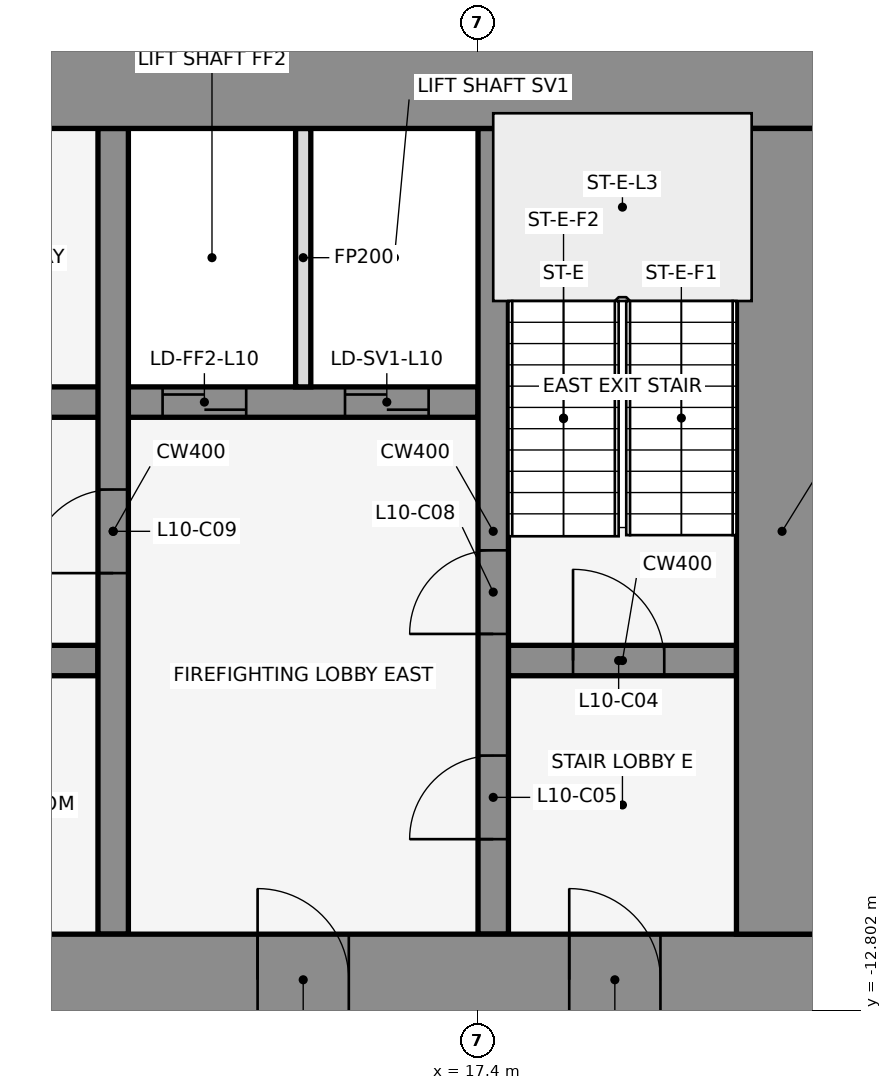
"""IFC4 building model, lengths in metres.
Left out: names, types, materials, properties, quantities, classifications, styles, units other than length and angle.
Written with IfcOpenShell. Run it as: python <this file> out.ifc"""

import sys

from ifc_helpers import new_model, si_unit, direction, frame, frame_2d, origin, place, context, subcontext, project, spatial, rectangle, extrude, element, fill, save


model = new_model("IFC4")
c1 = context("Model", 3, precision=1e-05, world=origin(), true_north=direction((0.0, 1.0)))
c2 = subcontext(c1, "Body", "Model", "MODEL_VIEW")
j1 = project(units=[si_unit("LENGTHUNIT", "METRE"), si_unit("PLANEANGLEUNIT", "RADIAN")], contexts=[c1])
p1 = place(None, origin())
s1 = spatial("IfcSite", under=j1, at=p1, CompositionType="ELEMENT")
p2 = place(p1, origin())
s2 = spatial("IfcBuilding", under=s1, at=p2, CompositionType="ELEMENT")
p3 = place(p2, frame((0.0, 0.0, 53.0)))
s3 = spatial("IfcBuildingStorey", under=s2, at=p3, CompositionType="ELEMENT", Elevation=53.0)
p4 = place(p3, frame((16.432, -0.105, 0.0), z_axis=(0.0, 0.0, 1.0), x_axis=(-0.83981312244, 0.542875602121, 0.0)))
e1 = element("IfcWall", 1, at=p4, inside=s3, PredefinedType="STANDARD", context=c2, shape_type="SweptSolid", body=[
    extrude(rectangle(XDim=2.183, YDim=0.25, at=frame_2d((1.091, 0.0))), origin(), (0.0, 0.0, 1.0), 4.35),
])
p5 = place(p3, frame((6.4, -8.2, 0.0), z_axis=(0.0, 0.0, 1.0), x_axis=(1.0, 0.0, 0.0)))
e2 = element("IfcWall", 2, at=p5, inside=s3, PredefinedType="SHEAR", context=c2, shape_type="SweptSolid", body=[
    extrude(rectangle(XDim=6.0, YDim=0.4, at=frame_2d((3.0, 0.0))), origin(), (0.0, 0.0, 1.0), 4.5),
])
p6 = place(p5, frame((4.15, 0.0, 0.0)))
e3 = element("IfcOpeningElement", 3, at=p6, cuts=e2, PredefinedType="OPENING", context=c2, shape_type="SweptSolid", body=[
    extrude(rectangle(XDim=0.9, YDim=2.1, at=frame_2d((0.45, 1.05))), frame((0.0, 0.212, 0.0), z_axis=(0.0, -1.0, 0.0), x_axis=(1.0, 0.0, 0.0)), (0.0, 0.0, 1.0), 0.424),
])
p7 = place(p3, frame((17.8, -8.2, 0.0), z_axis=(0.0, 0.0, 1.0), x_axis=(1.0, 0.0, 0.0)))
e4 = element("IfcWall", 4, at=p7, inside=s3, PredefinedType="SHEAR", context=c2, shape_type="SweptSolid", body=[
    extrude(rectangle(XDim=3.0, YDim=0.4, at=frame_2d((1.5, 0.0))), origin(), (0.0, 0.0, 1.0), 4.5),
])
p8 = place(p7, frame((0.85, 0.0, 0.0)))
e5 = element("IfcOpeningElement", 5, at=p8, cuts=e4, PredefinedType="OPENING", context=c2, shape_type="SweptSolid", body=[
    extrude(rectangle(XDim=1.2, YDim=2.1, at=frame_2d((0.6, 1.05))), frame((0.0, 0.212, 0.0), z_axis=(0.0, -1.0, 0.0), x_axis=(1.0, 0.0, 0.0)), (0.0, 0.0, 1.0), 0.424),
])
p9 = place(p3, frame((3.8, -4.8, 0.0), z_axis=(0.0, 0.0, 1.0), x_axis=(1.0, 0.0, 0.0)))
e6 = element("IfcWall", 6, at=p9, inside=s3, PredefinedType="SHEAR", context=c2, shape_type="SweptSolid", body=[
    extrude(rectangle(XDim=13.6, YDim=0.4, at=frame_2d((6.8, 0.0))), origin(), (0.0, 0.0, 1.0), 4.5),
])
p10 = place(p9, frame((9.45, 0.0, 0.0)))
e7 = element("IfcOpeningElement", 7, at=p10, cuts=e6, PredefinedType="OPENING", context=c2, shape_type="SweptSolid", body=[
    extrude(rectangle(XDim=1.1, YDim=2.1, at=frame_2d((0.55, 1.05))), frame((0.0, 0.212, 0.0), z_axis=(0.0, -1.0, 0.0), x_axis=(1.0, 0.0, 0.0)), (0.0, 0.0, 1.0), 0.424),
])
p11 = place(p9, frame((11.85, 0.0, 0.0)))
e8 = element("IfcOpeningElement", 8, at=p11, cuts=e6, PredefinedType="OPENING", context=c2, shape_type="SweptSolid", body=[
    extrude(rectangle(XDim=1.1, YDim=2.1, at=frame_2d((0.55, 1.05))), frame((0.0, 0.212, 0.0), z_axis=(0.0, -1.0, 0.0), x_axis=(1.0, 0.0, 0.0)), (0.0, 0.0, 1.0), 0.424),
])
p12 = place(p9, frame((2.45, 0.0, 0.0)))
e9 = element("IfcOpeningElement", 9, at=p12, cuts=e6, PredefinedType="OPENING", context=c2, shape_type="SweptSolid", body=[
    extrude(rectangle(XDim=0.9, YDim=2.1, at=frame_2d((0.45, 1.05))), frame((0.0, 0.212, 0.0), z_axis=(0.0, -1.0, 0.0), x_axis=(1.0, 0.0, 0.0)), (0.0, 0.0, 1.0), 0.424),
])
p13 = place(p9, frame((6.85, 0.0, 0.0)))
e10 = element("IfcOpeningElement", 10, at=p13, cuts=e6, PredefinedType="OPENING", context=c2, shape_type="SweptSolid", body=[
    extrude(rectangle(XDim=0.9, YDim=2.1, at=frame_2d((0.45, 1.05))), frame((0.0, 0.212, 0.0), z_axis=(0.0, -1.0, 0.0), x_axis=(1.0, 0.0, 0.0)), (0.0, 0.0, 1.0), 0.424),
])
p14 = place(p3, frame((12.6, -11.8, 0.0), z_axis=(0.0, 0.0, 1.0), x_axis=(0.0, 1.0, 0.0)))
e11 = element("IfcWall", 11, at=p14, inside=s3, PredefinedType="SHEAR", context=c2, shape_type="SweptSolid", body=[
    extrude(rectangle(XDim=10.6, YDim=0.4, at=frame_2d((5.3, 0.0))), origin(), (0.0, 0.0, 1.0), 4.5),
])
p15 = place(p14, frame((4.75, 0.0, 0.0)))
e12 = element("IfcOpeningElement", 12, at=p15, cuts=e11, PredefinedType="OPENING", context=c2, shape_type="SweptSolid", body=[
    extrude(rectangle(XDim=1.1, YDim=2.1, at=frame_2d((0.55, 1.05))), frame((0.0, 0.212, 0.0), z_axis=(0.0, -1.0, 0.0), x_axis=(1.0, 0.0, 0.0)), (0.0, 0.0, 1.0), 0.424),
])
p16 = place(p3, frame((15.1, -4.6, 0.0), z_axis=(0.0, 0.0, 1.0), x_axis=(0.0, 1.0, 0.0)))
e13 = element("IfcWall", 13, at=p16, inside=s3, PredefinedType="PARTITIONING", context=c2, shape_type="SweptSolid", body=[
    extrude(rectangle(XDim=3.4, YDim=0.2, at=frame_2d((1.7, 0.0))), origin(), (0.0, 0.0, 1.0), 3.418),
])
p17 = place(p3, frame((17.6, -11.8, 0.0), z_axis=(0.0, 0.0, 1.0), x_axis=(0.0, 1.0, 0.0)))
e14 = element("IfcWall", 14, at=p17, inside=s3, PredefinedType="SHEAR", context=c2, shape_type="SweptSolid", body=[
    extrude(rectangle(XDim=10.6, YDim=0.4, at=frame_2d((5.3, 0.0))), origin(), (0.0, 0.0, 1.0), 4.5),
])
p18 = place(p17, frame((1.25, 0.0, 0.0)))
e15 = element("IfcOpeningElement", 15, at=p18, cuts=e14, PredefinedType="OPENING", context=c2, shape_type="SweptSolid", body=[
    extrude(rectangle(XDim=1.1, YDim=2.1, at=frame_2d((0.55, 1.05))), frame((0.0, 0.212, 0.0), z_axis=(0.0, -1.0, 0.0), x_axis=(1.0, 0.0, 0.0)), (0.0, 0.0, 1.0), 0.424),
])
p19 = place(p17, frame((3.95, 0.0, 0.0)))
e16 = element("IfcOpeningElement", 16, at=p19, cuts=e14, PredefinedType="OPENING", context=c2, shape_type="SweptSolid", body=[
    extrude(rectangle(XDim=1.1, YDim=2.1, at=frame_2d((0.55, 1.05))), frame((0.0, 0.212, 0.0), z_axis=(0.0, -1.0, 0.0), x_axis=(1.0, 0.0, 0.0)), (0.0, 0.0, 1.0), 0.424),
])
p20 = place(p3, frame((-22.0, -0.6, 0.0), z_axis=(0.0, 0.0, 1.0), x_axis=(1.0, 0.0, 0.0)))
e17 = element("IfcWall", 17, at=p20, inside=s3, PredefinedType="SHEAR", context=c2, shape_type="SweptSolid", body=[
    extrude(rectangle(XDim=44.0, YDim=1.2, at=frame_2d((22.0, 0.0))), origin(), (0.0, 0.0, 1.0), 4.5),
])
p21 = place(p20, frame((18.55, 0.0, 0.0)))
e18 = element("IfcOpeningElement", 18, at=p21, cuts=e17, PredefinedType="OPENING", context=c2, shape_type="SweptSolid", body=[
    extrude(rectangle(XDim=0.9, YDim=2.1, at=frame_2d((0.45, 1.05))), frame((0.0, 0.612, 0.0), z_axis=(0.0, -1.0, 0.0), x_axis=(1.0, 0.0, 0.0)), (0.0, 0.0, 1.0), 1.224),
])
p22 = place(p20, frame((24.55, 0.0, 0.0)))
e19 = element("IfcOpeningElement", 19, at=p22, cuts=e17, PredefinedType="OPENING", context=c2, shape_type="SweptSolid", body=[
    extrude(rectangle(XDim=0.9, YDim=2.1, at=frame_2d((0.45, 1.05))), frame((0.0, 0.612, 0.0), z_axis=(0.0, -1.0, 0.0), x_axis=(1.0, 0.0, 0.0)), (0.0, 0.0, 1.0), 1.224),
])
p23 = place(p3, frame((-22.0, -12.4, 0.0), z_axis=(0.0, 0.0, 1.0), x_axis=(1.0, 0.0, 0.0)))
e20 = element("IfcWall", 20, at=p23, inside=s3, PredefinedType="SHEAR", context=c2, shape_type="SweptSolid", body=[
    extrude(rectangle(XDim=44.0, YDim=1.2, at=frame_2d((22.0, 0.0))), origin(), (0.0, 0.0, 1.0), 4.5),
])
p24 = place(p23, frame((2.2, 0.0, 0.0)))
e21 = element("IfcOpeningElement", 21, at=p24, cuts=e20, PredefinedType="OPENING", context=c2, shape_type="SweptSolid", body=[
    extrude(rectangle(XDim=1.2, YDim=2.1, at=frame_2d((0.6, 1.05))), frame((0.0, 0.612, 0.0), z_axis=(0.0, -1.0, 0.0), x_axis=(1.0, 0.0, 0.0)), (0.0, 0.0, 1.0), 1.224),
])
p25 = place(p23, frame((21.4, 0.0, 0.0)))
e22 = element("IfcOpeningElement", 22, at=p25, cuts=e20, PredefinedType="OPENING", context=c2, shape_type="SweptSolid", body=[
    extrude(rectangle(XDim=1.2, YDim=2.1, at=frame_2d((0.6, 1.05))), frame((0.0, 0.612, 0.0), z_axis=(0.0, -1.0, 0.0), x_axis=(1.0, 0.0, 0.0)), (0.0, 0.0, 1.0), 1.224),
])
p26 = place(p23, frame((40.6, 0.0, 0.0)))
e23 = element("IfcOpeningElement", 23, at=p26, cuts=e20, PredefinedType="OPENING", context=c2, shape_type="SweptSolid", body=[
    extrude(rectangle(XDim=1.2, YDim=2.1, at=frame_2d((0.6, 1.05))), frame((0.0, 0.612, 0.0), z_axis=(0.0, -1.0, 0.0), x_axis=(1.0, 0.0, 0.0)), (0.0, 0.0, 1.0), 1.224),
])
p27 = place(p23, frame((16.0, 0.0, 0.0)))
e24 = element("IfcOpeningElement", 24, at=p27, cuts=e20, PredefinedType="OPENING", context=c2, shape_type="SweptSolid", body=[
    extrude(rectangle(XDim=1.8, YDim=2.1, at=frame_2d((0.9, 1.05))), frame((0.0, 0.612, 0.0), z_axis=(0.0, -1.0, 0.0), x_axis=(1.0, 0.0, 0.0)), (0.0, 0.0, 1.0), 1.224),
])
p28 = place(p23, frame((6.3, 0.0, 0.0)))
e25 = element("IfcOpeningElement", 25, at=p28, cuts=e20, PredefinedType="OPENING", context=c2, shape_type="SweptSolid", body=[
    extrude(rectangle(XDim=1.2, YDim=2.1, at=frame_2d((0.6, 1.05))), frame((0.0, 0.612, 0.0), z_axis=(0.0, -1.0, 0.0), x_axis=(1.0, 0.0, 0.0)), (0.0, 0.0, 1.0), 1.224),
])
p29 = place(p23, frame((26.2, 0.0, 0.0)))
e26 = element("IfcOpeningElement", 26, at=p29, cuts=e20, PredefinedType="OPENING", context=c2, shape_type="SweptSolid", body=[
    extrude(rectangle(XDim=1.8, YDim=2.1, at=frame_2d((0.9, 1.05))), frame((0.0, 0.612, 0.0), z_axis=(0.0, -1.0, 0.0), x_axis=(1.0, 0.0, 0.0)), (0.0, 0.0, 1.0), 1.224),
])
p30 = place(p23, frame((36.5, 0.0, 0.0)))
e27 = element("IfcOpeningElement", 27, at=p30, cuts=e20, PredefinedType="OPENING", context=c2, shape_type="SweptSolid", body=[
    extrude(rectangle(XDim=1.2, YDim=2.1, at=frame_2d((0.6, 1.05))), frame((0.0, 0.612, 0.0), z_axis=(0.0, -1.0, 0.0), x_axis=(1.0, 0.0, 0.0)), (0.0, 0.0, 1.0), 1.224),
])
p31 = place(p3, frame((21.4, -11.8, 0.0), z_axis=(0.0, 0.0, 1.0), x_axis=(0.0, 1.0, 0.0)))
e28 = element("IfcWall", 28, at=p31, inside=s3, PredefinedType="SHEAR", context=c2, shape_type="SweptSolid", body=[
    extrude(rectangle(XDim=10.6, YDim=1.2, at=frame_2d((5.3, 0.0))), origin(), (0.0, 0.0, 1.0), 4.5),
])
p32 = place(p8, origin())
e29 = element("IfcDoor", 29, at=p32, inside=s3, OperationType="SINGLE_SWING_RIGHT", PredefinedType="DOOR", context=c2, shape_type="SweptSolid", body=[
    extrude(rectangle(XDim=1.2, YDim=2.1, at=frame_2d((0.6, 1.05))), frame((0.0, 0.025, 0.0), z_axis=(0.0, -1.0, 0.0), x_axis=(1.0, 0.0, 0.0)), (0.0, 0.0, 1.0), 0.05),
])
fill(e5, e29)
p33 = place(p18, origin())
e30 = element("IfcDoor", 30, at=p33, inside=s3, OperationType="SINGLE_SWING_LEFT", PredefinedType="DOOR", context=c2, shape_type="SweptSolid", body=[
    extrude(rectangle(XDim=1.1, YDim=2.1, at=frame_2d((0.55, 1.05))), frame((0.0, 0.025, 0.0), z_axis=(0.0, -1.0, 0.0), x_axis=(1.0, 0.0, 0.0)), (0.0, 0.0, 1.0), 0.05),
])
fill(e15, e30)
p34 = place(p10, origin())
e31 = element("IfcDoor", 31, at=p34, inside=s3, OperationType="DOUBLE_DOOR_SLIDING", PredefinedType="DOOR", context=c2, shape_type="SweptSolid", body=[
    extrude(rectangle(XDim=1.1, YDim=2.1, at=frame_2d((0.55, 1.05))), frame((0.0, 0.025, 0.0), z_axis=(0.0, -1.0, 0.0), x_axis=(1.0, 0.0, 0.0)), (0.0, 0.0, 1.0), 0.05),
])
fill(e7, e31)
p35 = place(p11, origin())
e32 = element("IfcDoor", 32, at=p35, inside=s3, OperationType="DOUBLE_DOOR_SLIDING", PredefinedType="DOOR", context=c2, shape_type="SweptSolid", body=[
    extrude(rectangle(XDim=1.1, YDim=2.1, at=frame_2d((0.55, 1.05))), frame((0.0, 0.025, 0.0), z_axis=(0.0, -1.0, 0.0), x_axis=(1.0, 0.0, 0.0)), (0.0, 0.0, 1.0), 0.05),
])
fill(e8, e32)
p36 = place(p19, origin())
e33 = element("IfcDoor", 33, at=p36, inside=s3, OperationType="SINGLE_SWING_RIGHT", PredefinedType="DOOR", context=c2, shape_type="SweptSolid", body=[
    extrude(rectangle(XDim=1.1, YDim=2.1, at=frame_2d((0.55, 1.05))), frame((0.0, 0.025, 0.0), z_axis=(0.0, -1.0, 0.0), x_axis=(1.0, 0.0, 0.0)), (0.0, 0.0, 1.0), 0.05),
])
fill(e16, e33)
p37 = place(p15, frame((1.1, 0.0, 0.0), z_axis=(0.0, 0.0, 1.0), x_axis=(-1.0, 0.0, 0.0)))
e34 = element("IfcDoor", 34, at=p37, inside=s3, OperationType="SINGLE_SWING_RIGHT", PredefinedType="DOOR", context=c2, shape_type="SweptSolid", body=[
    extrude(rectangle(XDim=1.1, YDim=2.1, at=frame_2d((0.55, 1.05))), frame((0.0, 0.025, 0.0), z_axis=(0.0, -1.0, 0.0), x_axis=(1.0, 0.0, 0.0)), (0.0, 0.0, 1.0), 0.05),
])
fill(e12, e34)
p38 = place(p26, frame((1.2, 0.0, 0.0), z_axis=(0.0, 0.0, 1.0), x_axis=(-1.0, 0.0, 0.0)))
e35 = element("IfcDoor", 35, at=p38, inside=s3, OperationType="SINGLE_SWING_RIGHT", PredefinedType="DOOR", context=c2, shape_type="SweptSolid", body=[
    extrude(rectangle(XDim=1.2, YDim=2.1, at=frame_2d((0.6, 1.05))), frame((0.0, 0.025, 0.0), z_axis=(0.0, -1.0, 0.0), x_axis=(1.0, 0.0, 0.0)), (0.0, 0.0, 1.0), 0.05),
])
fill(e23, e35)
p39 = place(p30, frame((1.2, 0.0, 0.0), z_axis=(0.0, 0.0, 1.0), x_axis=(-1.0, 0.0, 0.0)))
e36 = element("IfcDoor", 36, at=p39, inside=s3, OperationType="SINGLE_SWING_RIGHT", PredefinedType="DOOR", context=c2, shape_type="SweptSolid", body=[
    extrude(rectangle(XDim=1.2, YDim=2.1, at=frame_2d((0.6, 1.05))), frame((0.0, 0.025, 0.0), z_axis=(0.0, -1.0, 0.0), x_axis=(1.0, 0.0, 0.0)), (0.0, 0.0, 1.0), 0.05),
])
fill(e27, e36)
save(model, sys.argv[1])
